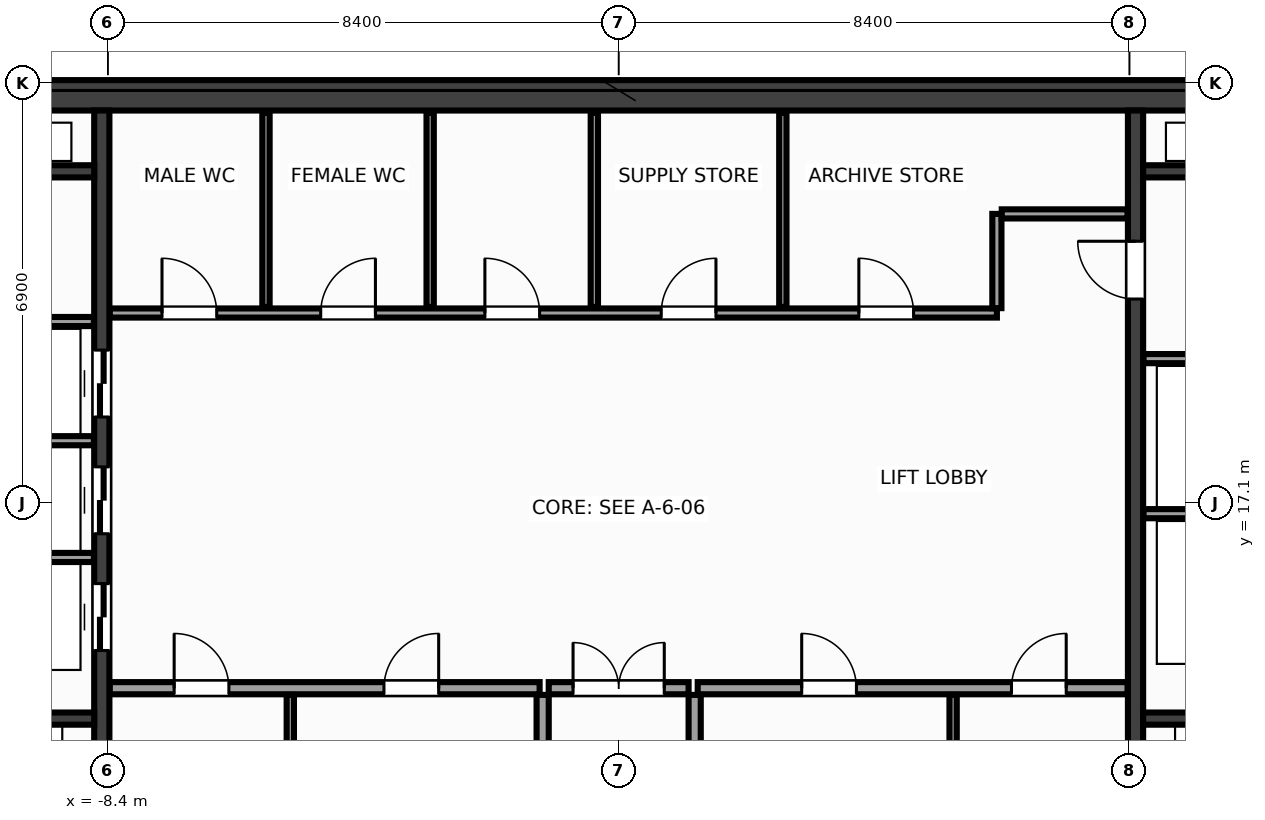
"""IFC4 building model, lengths in metres.
Left out: names, types, materials, properties, quantities, classifications, styles, units other than length and angle.
Written with IfcOpenShell. Run it as: python <this file> out.ifc"""

import sys

from ifc_helpers import new_model, si_unit, direction, frame, frame_2d, origin, place, context, subcontext, project, spatial, rectangle, extrude, source, transform, mapped, element, fill, save


model = new_model("IFC4")
c1 = context("Model", 3, precision=1e-05, world=origin(), true_north=direction((0.0, 1.0)))
c2 = subcontext(c1, "Body", "Model", "MODEL_VIEW")
j1 = project(units=[si_unit("LENGTHUNIT", "METRE"), si_unit("PLANEANGLEUNIT", "RADIAN")], contexts=[c1])
p1 = place(None, origin())
s1 = spatial("IfcSite", under=j1, at=p1, CompositionType="ELEMENT")
p2 = place(p1, origin())
s2 = spatial("IfcBuilding", under=s1, at=p2, CompositionType="ELEMENT")
p3 = place(p2, frame((0.0, 0.0, 225.2)))
s3 = spatial("IfcBuildingStorey", under=s2, at=p3, CompositionType="ELEMENT", Elevation=225.2)
m1 = source(origin(), c2, "Body", "SweptSolid", [
    extrude(rectangle(XDim=31.7, YDim=0.5, at=frame_2d((15.85, 0.0))), origin(), (0.0, 0.0, 1.0), 3.6),
])
p4 = place(p3, frame((-15.85, 23.8, 0.0), z_axis=(0.0, 0.0, 1.0), x_axis=(1.0, 0.0, 0.0)))
e1 = element("IfcWall", 1, at=p4, inside=s3, PredefinedType="SHEAR", context=c2, shape_type="MappedRepresentation", body=[
    mapped(m1, transform((0.0, 0.0, 0.0), x_axis=(1.0, 0.0, 0.0), y_axis=(0.0, 1.0, 0.0), z_axis=(0.0, 0.0, 1.0), scale=1.0)),
])
m2 = source(origin(), c2, "Body", "SweptSolid", [
    extrude(rectangle(XDim=13.1, YDim=0.25, at=frame_2d((6.55, 0.0))), origin(), (0.0, 0.0, 1.0), 3.6),
])
p5 = place(p3, frame((-8.5, 10.45, 0.0), z_axis=(0.0, 0.0, 1.0), x_axis=(0.0, 1.0, 0.0)))
e2 = element("IfcWall", 2, at=p5, inside=s3, PredefinedType="SHEAR", context=c2, shape_type="MappedRepresentation", body=[
    mapped(m2, transform((0.0, 0.0, 0.0), x_axis=(1.0, 0.0, 0.0), y_axis=(0.0, 1.0, 0.0), z_axis=(0.0, 0.0, 1.0), scale=1.0)),
])
p6 = place(p5, frame((4.22, 0.0, 0.0)))
e3 = element("IfcOpeningElement", 3, at=p6, cuts=e2, PredefinedType="OPENING", context=c2, shape_type="SweptSolid", body=[
    extrude(rectangle(XDim=1.1, YDim=2.15, at=frame_2d((0.55, 1.075))), frame((0.0, 0.137, 0.0), z_axis=(0.0, -1.0, 0.0), x_axis=(1.0, 0.0, 0.0)), (0.0, 0.0, 1.0), 0.274),
])
p7 = place(p5, frame((6.14, 0.0, 0.0)))
e4 = element("IfcOpeningElement", 4, at=p7, cuts=e2, PredefinedType="OPENING", context=c2, shape_type="SweptSolid", body=[
    extrude(rectangle(XDim=1.1, YDim=2.15, at=frame_2d((0.55, 1.075))), frame((0.0, 0.137, 0.0), z_axis=(0.0, -1.0, 0.0), x_axis=(1.0, 0.0, 0.0)), (0.0, 0.0, 1.0), 0.274),
])
p8 = place(p5, frame((8.06, 0.0, 0.0)))
e5 = element("IfcOpeningElement", 5, at=p8, cuts=e2, PredefinedType="OPENING", context=c2, shape_type="SweptSolid", body=[
    extrude(rectangle(XDim=1.1, YDim=2.15, at=frame_2d((0.55, 1.075))), frame((0.0, 0.137, 0.0), z_axis=(0.0, -1.0, 0.0), x_axis=(1.0, 0.0, 0.0)), (0.0, 0.0, 1.0), 0.274),
])
p9 = place(p3, frame((8.5, 10.45, 0.0), z_axis=(0.0, 0.0, 1.0), x_axis=(0.0, 1.0, 0.0)))
e6 = element("IfcWall", 6, at=p9, inside=s3, PredefinedType="SHEAR", context=c2, shape_type="MappedRepresentation", body=[
    mapped(m2, transform((0.0, 0.0, 0.0), x_axis=(1.0, 0.0, 0.0), y_axis=(0.0, 1.0, 0.0), z_axis=(0.0, 0.0, 1.0), scale=1.0)),
])
p10 = place(p9, frame((10.0, 0.0, 0.0)))
e7 = element("IfcOpeningElement", 7, at=p10, cuts=e6, PredefinedType="OPENING", context=c2, shape_type="SweptSolid", body=[
    extrude(rectangle(XDim=0.95, YDim=2.15, at=frame_2d((0.475, 1.075))), frame((0.0, 0.137, 0.0), z_axis=(0.0, -1.0, 0.0), x_axis=(1.0, 0.0, 0.0)), (0.0, 0.0, 1.0), 0.274),
])
m3 = source(origin(), c2, "Body", "SweptSolid", [
    extrude(rectangle(XDim=2.825, YDim=0.2, at=frame_2d((1.413, 0.0))), origin(), (0.0, 0.0, 1.0), 3.6),
])
for number, where, z_axis, x_axis in (
    (8, (-11.45, 13.55, 0.0), (0.0, 0.0, 1.0), (1.0, 0.0, 0.0)),
    (9, (8.625, 13.55, 0.0), (0.0, 0.0, 1.0), (1.0, 0.0, 0.0)),
):
    element("IfcWall", number, at=place(p3, frame(where, z_axis=z_axis, x_axis=x_axis)), inside=s3, PredefinedType="SHEAR", context=c2, shape_type="MappedRepresentation", body=[
        mapped(m3, transform((0.0, 0.0, 0.0), x_axis=(1.0, 0.0, 0.0), y_axis=(0.0, 1.0, 0.0), z_axis=(0.0, 0.0, 1.0), scale=1.0)),
    ])
m4 = source(origin(), c2, "Body", "SweptSolid", [
    extrude(rectangle(XDim=3.02, YDim=0.2, at=frame_2d((1.51, 0.0))), origin(), (0.0, 0.0, 1.0), 3.6),
])
for number, where, z_axis, x_axis in (
    (10, (-11.645, 22.55, 0.0), (0.0, 0.0, 1.0), (1.0, 0.0, 0.0)),
    (11, (8.625, 22.55, 0.0), (0.0, 0.0, 1.0), (1.0, 0.0, 0.0)),
):
    element("IfcWall", number, at=place(p3, frame(where, z_axis=z_axis, x_axis=x_axis)), inside=s3, PredefinedType="SHEAR", context=c2, shape_type="MappedRepresentation", body=[
        mapped(m4, transform((0.0, 0.0, 0.0), x_axis=(1.0, 0.0, 0.0), y_axis=(0.0, 1.0, 0.0), z_axis=(0.0, 0.0, 1.0), scale=1.0)),
    ])
m5 = source(origin(), c2, "Body", "SweptSolid", [
    extrude(rectangle(XDim=3.01, YDim=0.15, at=frame_2d((1.505, 0.0))), origin(), (0.0, 0.0, 1.0), 3.28),
])
for number, where, z_axis, x_axis in (
    (12, (-11.64, 16.2, 0.0), (0.0, 0.0, 1.0), (1.0, 0.0, 0.0)),
    (13, (-11.64, 18.12, 0.0), (0.0, 0.0, 1.0), (1.0, 0.0, 0.0)),
    (14, (-11.64, 20.08, 0.0), (0.0, 0.0, 1.0), (1.0, 0.0, 0.0)),
    (15, (8.63, 16.92, 0.0), (0.0, 0.0, 1.0), (1.0, 0.0, 0.0)),
    (16, (8.63, 19.47, 0.0), (0.0, 0.0, 1.0), (1.0, 0.0, 0.0)),
):
    element("IfcWall", number, at=place(p3, frame(where, z_axis=z_axis, x_axis=x_axis)), inside=s3, PredefinedType="PARTITIONING", context=c2, shape_type="MappedRepresentation", body=[
        mapped(m5, transform((0.0, 0.0, 0.0), x_axis=(1.0, 0.0, 0.0), y_axis=(0.0, 1.0, 0.0), z_axis=(0.0, 0.0, 1.0), scale=1.0)),
    ])
m6 = source(origin(), c2, "Body", "SweptSolid", [
    extrude(rectangle(XDim=7.07, YDim=0.2, at=frame_2d((3.535, 0.0))), origin(), (0.0, 0.0, 1.0), 3.28),
])
p11 = place(p3, frame((-8.37, 14.05, 0.0), z_axis=(0.0, 0.0, 1.0), x_axis=(1.0, 0.0, 0.0)))
e17 = element("IfcWall", 17, at=p11, inside=s3, PredefinedType="PARTITIONING", context=c2, shape_type="MappedRepresentation", body=[
    mapped(m6, transform((0.0, 0.0, 0.0), x_axis=(1.0, 0.0, 0.0), y_axis=(0.0, 1.0, 0.0), z_axis=(0.0, 0.0, 1.0), scale=1.0)),
])
p12 = place(p11, frame((1.06, 0.0, 0.0)))
e18 = element("IfcOpeningElement", 18, at=p12, cuts=e17, PredefinedType="OPENING", context=c2, shape_type="SweptSolid", body=[
    extrude(rectangle(XDim=0.9, YDim=2.15, at=frame_2d((0.45, 1.075))), frame((0.0, 0.112, 0.0), z_axis=(0.0, -1.0, 0.0), x_axis=(1.0, 0.0, 0.0)), (0.0, 0.0, 1.0), 0.224),
])
p13 = place(p11, frame((4.51, 0.0, 0.0)))
e19 = element("IfcOpeningElement", 19, at=p13, cuts=e17, PredefinedType="OPENING", context=c2, shape_type="SweptSolid", body=[
    extrude(rectangle(XDim=0.9, YDim=2.15, at=frame_2d((0.45, 1.075))), frame((0.0, 0.112, 0.0), z_axis=(0.0, -1.0, 0.0), x_axis=(1.0, 0.0, 0.0)), (0.0, 0.0, 1.0), 0.224),
])
p14 = place(p3, frame((1.3, 14.05, 0.0), z_axis=(0.0, 0.0, 1.0), x_axis=(1.0, 0.0, 0.0)))
e20 = element("IfcWall", 20, at=p14, inside=s3, PredefinedType="PARTITIONING", context=c2, shape_type="MappedRepresentation", body=[
    mapped(m6, transform((0.0, 0.0, 0.0), x_axis=(1.0, 0.0, 0.0), y_axis=(0.0, 1.0, 0.0), z_axis=(0.0, 0.0, 1.0), scale=1.0)),
])
p15 = place(p14, frame((1.71, 0.0, 0.0)))
e21 = element("IfcOpeningElement", 21, at=p15, cuts=e20, PredefinedType="OPENING", context=c2, shape_type="SweptSolid", body=[
    extrude(rectangle(XDim=0.9, YDim=2.15, at=frame_2d((0.45, 1.075))), frame((0.0, 0.112, 0.0), z_axis=(0.0, -1.0, 0.0), x_axis=(1.0, 0.0, 0.0)), (0.0, 0.0, 1.0), 0.224),
])
p16 = place(p14, frame((5.16, 0.0, 0.0)))
e22 = element("IfcOpeningElement", 22, at=p16, cuts=e20, PredefinedType="OPENING", context=c2, shape_type="SweptSolid", body=[
    extrude(rectangle(XDim=0.9, YDim=2.15, at=frame_2d((0.45, 1.075))), frame((0.0, 0.112, 0.0), z_axis=(0.0, -1.0, 0.0), x_axis=(1.0, 0.0, 0.0)), (0.0, 0.0, 1.0), 0.224),
])
m7 = source(origin(), c2, "Body", "SweptSolid", [
    extrude(rectangle(XDim=3.49, YDim=0.2, at=frame_2d((1.745, 0.0))), origin(), (0.0, 0.0, 1.0), 3.28),
])
for number, where, z_axis, x_axis in (
    (23, (-1.25, 10.45, 0.0), (0.0, 0.0, 1.0), (0.0, 1.0, 0.0)),
    (24, (1.25, 10.45, 0.0), (0.0, 0.0, 1.0), (0.0, 1.0, 0.0)),
):
    element("IfcWall", number, at=place(p3, frame(where, z_axis=z_axis, x_axis=x_axis)), inside=s3, PredefinedType="PARTITIONING", context=c2, shape_type="MappedRepresentation", body=[
        mapped(m7, transform((0.0, 0.0, 0.0), x_axis=(1.0, 0.0, 0.0), y_axis=(0.0, 1.0, 0.0), z_axis=(0.0, 0.0, 1.0), scale=1.0)),
    ])
m8 = source(origin(), c2, "Body", "SweptSolid", [
    extrude(rectangle(XDim=2.3, YDim=0.2, at=frame_2d((1.15, 0.0))), origin(), (0.0, 0.0, 1.0), 3.28),
])
p17 = place(p3, frame((-1.15, 14.05, 0.0), z_axis=(0.0, 0.0, 1.0), x_axis=(1.0, 0.0, 0.0)))
e25 = element("IfcWall", 25, at=p17, inside=s3, PredefinedType="PARTITIONING", context=c2, shape_type="MappedRepresentation", body=[
    mapped(m8, transform((0.0, 0.0, 0.0), x_axis=(1.0, 0.0, 0.0), y_axis=(0.0, 1.0, 0.0), z_axis=(0.0, 0.0, 1.0), scale=1.0)),
])
p18 = place(p17, frame((0.4, 0.0, 0.0)))
e26 = element("IfcOpeningElement", 26, at=p18, cuts=e25, PredefinedType="OPENING", context=c2, shape_type="SweptSolid", body=[
    extrude(rectangle(XDim=1.5, YDim=2.2, at=frame_2d((0.75, 1.1))), frame((0.0, 0.112, 0.0), z_axis=(0.0, -1.0, 0.0), x_axis=(1.0, 0.0, 0.0)), (0.0, 0.0, 1.0), 0.224),
])
m9 = source(origin(), c2, "Body", "SweptSolid", [
    extrude(rectangle(XDim=14.59, YDim=0.15, at=frame_2d((7.295, 0.0))), origin(), (0.0, 0.0, 1.0), 3.28),
])
p19 = place(p3, frame((-8.37, 20.22, 0.0), z_axis=(0.0, 0.0, 1.0), x_axis=(1.0, 0.0, 0.0)))
e27 = element("IfcWall", 27, at=p19, inside=s3, PredefinedType="PARTITIONING", context=c2, shape_type="MappedRepresentation", body=[
    mapped(m9, transform((0.0, 0.0, 0.0), x_axis=(1.0, 0.0, 0.0), y_axis=(0.0, 1.0, 0.0), z_axis=(0.0, 0.0, 1.0), scale=1.0)),
])
p20 = place(p19, frame((0.86, 0.0, 0.0)))
e28 = element("IfcOpeningElement", 28, at=p20, cuts=e27, PredefinedType="OPENING", context=c2, shape_type="SweptSolid", body=[
    extrude(rectangle(XDim=0.9, YDim=2.15, at=frame_2d((0.45, 1.075))), frame((0.0, 0.087, 0.0), z_axis=(0.0, -1.0, 0.0), x_axis=(1.0, 0.0, 0.0)), (0.0, 0.0, 1.0), 0.174),
])
p21 = place(p19, frame((3.47, 0.0, 0.0)))
e29 = element("IfcOpeningElement", 29, at=p21, cuts=e27, PredefinedType="OPENING", context=c2, shape_type="SweptSolid", body=[
    extrude(rectangle(XDim=0.9, YDim=2.15, at=frame_2d((0.45, 1.075))), frame((0.0, 0.087, 0.0), z_axis=(0.0, -1.0, 0.0), x_axis=(1.0, 0.0, 0.0)), (0.0, 0.0, 1.0), 0.174),
])
p22 = place(p19, frame((6.17, 0.0, 0.0)))
e30 = element("IfcOpeningElement", 30, at=p22, cuts=e27, PredefinedType="OPENING", context=c2, shape_type="SweptSolid", body=[
    extrude(rectangle(XDim=0.9, YDim=2.15, at=frame_2d((0.45, 1.075))), frame((0.0, 0.087, 0.0), z_axis=(0.0, -1.0, 0.0), x_axis=(1.0, 0.0, 0.0)), (0.0, 0.0, 1.0), 0.174),
])
p23 = place(p19, frame((9.07, 0.0, 0.0)))
e31 = element("IfcOpeningElement", 31, at=p23, cuts=e27, PredefinedType="OPENING", context=c2, shape_type="SweptSolid", body=[
    extrude(rectangle(XDim=0.9, YDim=2.15, at=frame_2d((0.45, 1.075))), frame((0.0, 0.087, 0.0), z_axis=(0.0, -1.0, 0.0), x_axis=(1.0, 0.0, 0.0)), (0.0, 0.0, 1.0), 0.174),
])
p24 = place(p19, frame((12.32, 0.0, 0.0)))
e32 = element("IfcOpeningElement", 32, at=p24, cuts=e27, PredefinedType="OPENING", context=c2, shape_type="SweptSolid", body=[
    extrude(rectangle(XDim=0.9, YDim=2.15, at=frame_2d((0.45, 1.075))), frame((0.0, 0.087, 0.0), z_axis=(0.0, -1.0, 0.0), x_axis=(1.0, 0.0, 0.0)), (0.0, 0.0, 1.0), 0.174),
])
m10 = source(origin(), c2, "Body", "SweptSolid", [
    extrude(rectangle(XDim=1.55, YDim=0.15, at=frame_2d((0.775, 0.0))), origin(), (0.0, 0.0, 1.0), 3.28),
])
p25 = place(p3, frame((6.22, 20.3, 0.0), z_axis=(0.0, 0.0, 1.0), x_axis=(0.0, 1.0, 0.0)))
e33 = element("IfcWall", 33, at=p25, inside=s3, PredefinedType="PARTITIONING", context=c2, shape_type="MappedRepresentation", body=[
    mapped(m10, transform((0.0, 0.0, 0.0), x_axis=(1.0, 0.0, 0.0), y_axis=(0.0, 1.0, 0.0), z_axis=(0.0, 0.0, 1.0), scale=1.0)),
])
m11 = source(origin(), c2, "Body", "SweptSolid", [
    extrude(rectangle(XDim=2.07, YDim=0.15, at=frame_2d((1.035, 0.0))), origin(), (0.0, 0.0, 1.0), 3.28),
])
p26 = place(p3, frame((6.3, 21.85, 0.0), z_axis=(0.0, 0.0, 1.0), x_axis=(1.0, 0.0, 0.0)))
e34 = element("IfcWall", 34, at=p26, inside=s3, PredefinedType="PARTITIONING", context=c2, shape_type="MappedRepresentation", body=[
    mapped(m11, transform((0.0, 0.0, 0.0), x_axis=(1.0, 0.0, 0.0), y_axis=(0.0, 1.0, 0.0), z_axis=(0.0, 0.0, 1.0), scale=1.0)),
])
m12 = source(origin(), c2, "Body", "SweptSolid", [
    extrude(rectangle(XDim=3.49, YDim=0.12, at=frame_2d((1.745, 0.0))), origin(), (0.0, 0.0, 1.0), 3.28),
])
for number, where, z_axis, x_axis in (
    (35, (-5.4, 10.45, 0.0), (0.0, 0.0, 1.0), (0.0, 1.0, 0.0)),
    (36, (5.5, 10.45, 0.0), (0.0, 0.0, 1.0), (0.0, 1.0, 0.0)),
):
    element("IfcWall", number, at=place(p3, frame(where, z_axis=z_axis, x_axis=x_axis)), inside=s3, PredefinedType="PARTITIONING", context=c2, shape_type="MappedRepresentation", body=[
        mapped(m12, transform((0.0, 0.0, 0.0), x_axis=(1.0, 0.0, 0.0), y_axis=(0.0, 1.0, 0.0), z_axis=(0.0, 0.0, 1.0), scale=1.0)),
    ])
m13 = source(origin(), c2, "Body", "SweptSolid", [
    extrude(rectangle(XDim=3.19, YDim=0.12, at=frame_2d((1.595, 0.0))), origin(), (0.0, 0.0, 1.0), 3.28),
])
for number, where, z_axis, x_axis in (
    (37, (-5.8, 20.32, 0.0), (0.0, 0.0, 1.0), (0.0, 1.0, 0.0)),
    (38, (-3.1, 20.32, 0.0), (0.0, 0.0, 1.0), (0.0, 1.0, 0.0)),
    (39, (-0.4, 20.32, 0.0), (0.0, 0.0, 1.0), (0.0, 1.0, 0.0)),
    (40, (2.7, 20.32, 0.0), (0.0, 0.0, 1.0), (0.0, 1.0, 0.0)),
):
    element("IfcWall", number, at=place(p3, frame(where, z_axis=z_axis, x_axis=x_axis)), inside=s3, PredefinedType="PARTITIONING", context=c2, shape_type="MappedRepresentation", body=[
        mapped(m13, transform((0.0, 0.0, 0.0), x_axis=(1.0, 0.0, 0.0), y_axis=(0.0, 1.0, 0.0), z_axis=(0.0, 0.0, 1.0), scale=1.0)),
    ])
m14 = source(origin(), c2, "Body", "SweptSolid", [
    extrude(rectangle(XDim=1.1, YDim=2.15, at=frame_2d((0.55, 1.075))), frame((0.0, 0.025, 0.0), z_axis=(0.0, -1.0, 0.0), x_axis=(1.0, 0.0, 0.0)), (0.0, 0.0, 1.0), 0.05),
])
p27 = place(p6, origin())
e41 = element("IfcDoor", 41, at=p27, inside=s3, OperationType="DOUBLE_DOOR_SLIDING", PredefinedType="DOOR", context=c2, shape_type="MappedRepresentation", body=[
    mapped(m14, transform((0.0, 0.0, 0.0), x_axis=(1.0, 0.0, 0.0), y_axis=(0.0, 1.0, 0.0), z_axis=(0.0, 0.0, 1.0), scale=1.0)),
])
fill(e3, e41)
p28 = place(p7, origin())
e42 = element("IfcDoor", 42, at=p28, inside=s3, OperationType="DOUBLE_DOOR_SLIDING", PredefinedType="DOOR", context=c2, shape_type="MappedRepresentation", body=[
    mapped(m14, transform((0.0, 0.0, 0.0), x_axis=(1.0, 0.0, 0.0), y_axis=(0.0, 1.0, 0.0), z_axis=(0.0, 0.0, 1.0), scale=1.0)),
])
fill(e4, e42)
p29 = place(p8, origin())
e43 = element("IfcDoor", 43, at=p29, inside=s3, OperationType="DOUBLE_DOOR_SLIDING", PredefinedType="DOOR", context=c2, shape_type="MappedRepresentation", body=[
    mapped(m14, transform((0.0, 0.0, 0.0), x_axis=(1.0, 0.0, 0.0), y_axis=(0.0, 1.0, 0.0), z_axis=(0.0, 0.0, 1.0), scale=1.0)),
])
fill(e5, e43)
m15 = source(origin(), c2, "Body", "SweptSolid", [
    extrude(rectangle(XDim=0.95, YDim=2.15, at=frame_2d((0.475, 1.075))), frame((0.0, 0.025, 0.0), z_axis=(0.0, -1.0, 0.0), x_axis=(1.0, 0.0, 0.0)), (0.0, 0.0, 1.0), 0.05),
])
p30 = place(p10, origin())
e44 = element("IfcDoor", 44, at=p30, inside=s3, OperationType="SINGLE_SWING_RIGHT", PredefinedType="DOOR", context=c2, shape_type="MappedRepresentation", body=[
    mapped(m15, transform((0.0, 0.0, 0.0), x_axis=(1.0, 0.0, 0.0), y_axis=(0.0, 1.0, 0.0), z_axis=(0.0, 0.0, 1.0), scale=1.0)),
])
fill(e7, e44)
m16 = source(origin(), c2, "Body", "SweptSolid", [
    extrude(rectangle(XDim=0.9, YDim=2.15, at=frame_2d((0.45, 1.075))), frame((0.0, 0.025, 0.0), z_axis=(0.0, -1.0, 0.0), x_axis=(1.0, 0.0, 0.0)), (0.0, 0.0, 1.0), 0.05),
])
p31 = place(p12, origin())
e45 = element("IfcDoor", 45, at=p31, inside=s3, OperationType="SINGLE_SWING_LEFT", PredefinedType="DOOR", context=c2, shape_type="MappedRepresentation", body=[
    mapped(m16, transform((0.0, 0.0, 0.0), x_axis=(1.0, 0.0, 0.0), y_axis=(0.0, 1.0, 0.0), z_axis=(0.0, 0.0, 1.0), scale=1.0)),
])
fill(e18, e45)
p32 = place(p13, origin())
e46 = element("IfcDoor", 46, at=p32, inside=s3, OperationType="SINGLE_SWING_RIGHT", PredefinedType="DOOR", context=c2, shape_type="MappedRepresentation", body=[
    mapped(m16, transform((0.0, 0.0, 0.0), x_axis=(1.0, 0.0, 0.0), y_axis=(0.0, 1.0, 0.0), z_axis=(0.0, 0.0, 1.0), scale=1.0)),
])
fill(e19, e46)
p33 = place(p15, origin())
e47 = element("IfcDoor", 47, at=p33, inside=s3, OperationType="SINGLE_SWING_LEFT", PredefinedType="DOOR", context=c2, shape_type="MappedRepresentation", body=[
    mapped(m16, transform((0.0, 0.0, 0.0), x_axis=(1.0, 0.0, 0.0), y_axis=(0.0, 1.0, 0.0), z_axis=(0.0, 0.0, 1.0), scale=1.0)),
])
fill(e21, e47)
p34 = place(p16, origin())
e48 = element("IfcDoor", 48, at=p34, inside=s3, OperationType="SINGLE_SWING_RIGHT", PredefinedType="DOOR", context=c2, shape_type="MappedRepresentation", body=[
    mapped(m16, transform((0.0, 0.0, 0.0), x_axis=(1.0, 0.0, 0.0), y_axis=(0.0, 1.0, 0.0), z_axis=(0.0, 0.0, 1.0), scale=1.0)),
])
fill(e22, e48)
m17 = source(origin(), c2, "Body", "SweptSolid", [
    extrude(rectangle(XDim=1.5, YDim=2.2, at=frame_2d((0.75, 1.1))), frame((0.0, 0.025, 0.0), z_axis=(0.0, -1.0, 0.0), x_axis=(1.0, 0.0, 0.0)), (0.0, 0.0, 1.0), 0.05),
])
p35 = place(p18, origin())
e49 = element("IfcDoor", 49, at=p35, inside=s3, OperationType="DOUBLE_DOOR_SINGLE_SWING", PredefinedType="DOOR", context=c2, shape_type="MappedRepresentation", body=[
    mapped(m17, transform((0.0, 0.0, 0.0), x_axis=(1.0, 0.0, 0.0), y_axis=(0.0, 1.0, 0.0), z_axis=(0.0, 0.0, 1.0), scale=1.0)),
])
fill(e26, e49)
p36 = place(p20, origin())
e50 = element("IfcDoor", 50, at=p36, inside=s3, OperationType="SINGLE_SWING_LEFT", PredefinedType="DOOR", context=c2, shape_type="MappedRepresentation", body=[
    mapped(m16, transform((0.0, 0.0, 0.0), x_axis=(1.0, 0.0, 0.0), y_axis=(0.0, 1.0, 0.0), z_axis=(0.0, 0.0, 1.0), scale=1.0)),
])
fill(e28, e50)
p37 = place(p21, origin())
e51 = element("IfcDoor", 51, at=p37, inside=s3, OperationType="SINGLE_SWING_RIGHT", PredefinedType="DOOR", context=c2, shape_type="MappedRepresentation", body=[
    mapped(m16, transform((0.0, 0.0, 0.0), x_axis=(1.0, 0.0, 0.0), y_axis=(0.0, 1.0, 0.0), z_axis=(0.0, 0.0, 1.0), scale=1.0)),
])
fill(e29, e51)
p38 = place(p22, origin())
e52 = element("IfcDoor", 52, at=p38, inside=s3, OperationType="SINGLE_SWING_LEFT", PredefinedType="DOOR", context=c2, shape_type="MappedRepresentation", body=[
    mapped(m16, transform((0.0, 0.0, 0.0), x_axis=(1.0, 0.0, 0.0), y_axis=(0.0, 1.0, 0.0), z_axis=(0.0, 0.0, 1.0), scale=1.0)),
])
fill(e30, e52)
p39 = place(p23, origin())
e53 = element("IfcDoor", 53, at=p39, inside=s3, OperationType="SINGLE_SWING_RIGHT", PredefinedType="DOOR", context=c2, shape_type="MappedRepresentation", body=[
    mapped(m16, transform((0.0, 0.0, 0.0), x_axis=(1.0, 0.0, 0.0), y_axis=(0.0, 1.0, 0.0), z_axis=(0.0, 0.0, 1.0), scale=1.0)),
])
fill(e31, e53)
p40 = place(p24, origin())
e54 = element("IfcDoor", 54, at=p40, inside=s3, OperationType="SINGLE_SWING_LEFT", PredefinedType="DOOR", context=c2, shape_type="MappedRepresentation", body=[
    mapped(m16, transform((0.0, 0.0, 0.0), x_axis=(1.0, 0.0, 0.0), y_axis=(0.0, 1.0, 0.0), z_axis=(0.0, 0.0, 1.0), scale=1.0)),
])
fill(e32, e54)
save(model, sys.argv[1])
